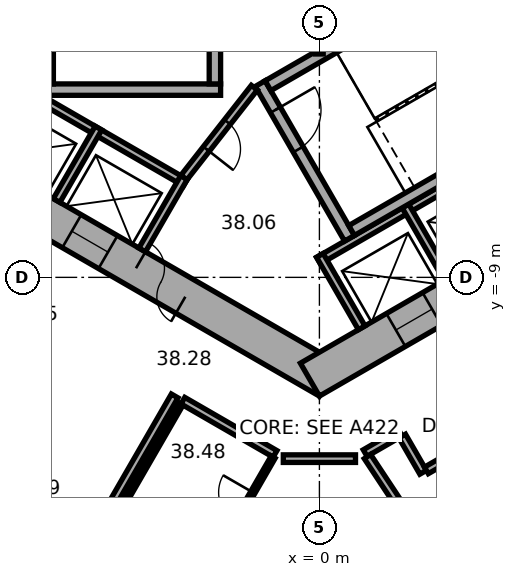
"""IFC4 building model, lengths in metres.
Left out: names, types, materials, properties, quantities, classifications, styles, units other than length and angle.
Written with IfcOpenShell. Run it as: python <this file> out.ifc"""

import sys

from ifc_helpers import new_model, si_unit, direction, frame, frame_2d, origin, place, context, subcontext, project, spatial, rectangle, extrude, element, fill, save


model = new_model("IFC4")
c1 = context("Model", 3, precision=1e-05, world=origin(), true_north=direction((0.0, 1.0)))
c2 = subcontext(c1, "Body", "Model", "MODEL_VIEW")
j1 = project(units=[si_unit("LENGTHUNIT", "METRE"), si_unit("PLANEANGLEUNIT", "RADIAN")], contexts=[c1])
p1 = place(None, origin())
s1 = spatial("IfcSite", under=j1, at=p1, CompositionType="ELEMENT")
p2 = place(p1, origin())
s2 = spatial("IfcBuilding", under=s1, at=p2, CompositionType="ELEMENT")
p3 = place(p2, frame((0.0, 0.0, 157.7)))
s3 = spatial("IfcBuildingStorey", under=s2, at=p3, CompositionType="ELEMENT", Elevation=157.7)
p4 = place(p3, frame((-10.25, -5.629, 0.0), z_axis=(0.0, 0.0, 1.0), x_axis=(0.866022616891, -0.50000482701, 0.0)))
e1 = element("IfcWall", 1, at=p4, inside=s3, PredefinedType="SHEAR", context=c2, shape_type="SweptSolid", body=[
    extrude(rectangle(XDim=12.125, YDim=1.0, at=frame_2d((6.062, 0.0))), origin(), (0.0, 0.0, 1.0), 3.7),
])
p5 = place(p4, frame((6.262, 0.0, 0.0)))
e2 = element("IfcOpeningElement", 2, at=p5, cuts=e1, PredefinedType="OPENING", context=c2, shape_type="SweptSolid", body=[
    extrude(rectangle(XDim=1.5, YDim=2.1, at=frame_2d((0.75, 1.05))), frame((0.0, 0.51, 0.0), z_axis=(0.0, -1.0, 0.0), x_axis=(1.0, 0.0, 0.0)), (0.0, 0.0, 1.0), 1.02),
])
p6 = place(p4, frame((1.712, 0.0, 0.0)))
e3 = element("IfcOpeningElement", 3, at=p6, cuts=e1, PredefinedType="OPENING", context=c2, shape_type="SweptSolid", body=[
    extrude(rectangle(XDim=1.1, YDim=2.1, at=frame_2d((0.55, 1.05))), frame((0.0, 0.51, 0.0), z_axis=(0.0, -1.0, 0.0), x_axis=(1.0, 0.0, 0.0)), (0.0, 0.0, 1.0), 1.02),
])
p7 = place(p4, frame((4.312, 0.0, 0.0)))
e4 = element("IfcOpeningElement", 4, at=p7, cuts=e1, PredefinedType="OPENING", context=c2, shape_type="SweptSolid", body=[
    extrude(rectangle(XDim=1.1, YDim=2.1, at=frame_2d((0.55, 1.05))), frame((0.0, 0.51, 0.0), z_axis=(0.0, -1.0, 0.0), x_axis=(1.0, 0.0, 0.0)), (0.0, 0.0, 1.0), 1.02),
])
p8 = place(p3, frame((-0.25, -11.691, 0.0), z_axis=(0.0, 0.0, 1.0), x_axis=(0.866022616891, 0.50000482701, 0.0)))
e5 = element("IfcWall", 5, at=p8, inside=s3, PredefinedType="SHEAR", context=c2, shape_type="SweptSolid", body=[
    extrude(rectangle(XDim=12.125, YDim=1.0, at=frame_2d((6.062, 0.0))), origin(), (0.0, 0.0, 1.0), 3.7),
])
p9 = place(p8, frame((2.612, 0.0, 0.0)))
e6 = element("IfcOpeningElement", 6, at=p9, cuts=e5, PredefinedType="OPENING", context=c2, shape_type="SweptSolid", body=[
    extrude(rectangle(XDim=1.1, YDim=2.1, at=frame_2d((0.55, 1.05))), frame((0.0, 0.51, 0.0), z_axis=(0.0, -1.0, 0.0), x_axis=(1.0, 0.0, 0.0)), (0.0, 0.0, 1.0), 1.02),
])
p10 = place(p8, frame((5.212, 0.0, 0.0)))
e7 = element("IfcOpeningElement", 7, at=p10, cuts=e5, PredefinedType="OPENING", context=c2, shape_type="SweptSolid", body=[
    extrude(rectangle(XDim=1.1, YDim=2.1, at=frame_2d((0.55, 1.05))), frame((0.0, 0.51, 0.0), z_axis=(0.0, -1.0, 0.0), x_axis=(1.0, 0.0, 0.0)), (0.0, 0.0, 1.0), 1.02),
])
p11 = place(p8, frame((7.812, 0.0, 0.0)))
e8 = element("IfcOpeningElement", 8, at=p11, cuts=e5, PredefinedType="OPENING", context=c2, shape_type="SweptSolid", body=[
    extrude(rectangle(XDim=1.1, YDim=2.1, at=frame_2d((0.55, 1.05))), frame((0.0, 0.51, 0.0), z_axis=(0.0, -1.0, 0.0), x_axis=(1.0, 0.0, 0.0)), (0.0, 0.0, 1.0), 1.02),
])
p12 = place(p3, frame((-18.789, -14.267, 0.0), z_axis=(0.0, 0.0, 1.0), x_axis=(0.866023315909, -0.500003616288, 0.0)))
e9 = element("IfcWall", 9, at=p12, inside=s3, PredefinedType="STANDARD", context=c2, shape_type="SweptSolid", body=[
    extrude(rectangle(XDim=20.044, YDim=0.2, at=frame_2d((10.022, 0.0))), origin(), (0.0, 0.0, 1.0), 3.7),
])
p13 = place(p12, frame((1.314, 0.0, 0.9)))
e10 = element("IfcOpeningElement", 10, at=p13, cuts=e9, PredefinedType="OPENING", context=c2, shape_type="SweptSolid", body=[
    extrude(rectangle(XDim=2.4, YDim=2.0, at=frame_2d((1.2, 1.0))), frame((0.0, 0.11, 0.0), z_axis=(0.0, -1.0, 0.0), x_axis=(1.0, 0.0, 0.0)), (0.0, 0.0, 1.0), 0.22),
])
p14 = place(p12, frame((5.069, 0.0, 0.9)))
e11 = element("IfcOpeningElement", 11, at=p14, cuts=e9, PredefinedType="OPENING", context=c2, shape_type="SweptSolid", body=[
    extrude(rectangle(XDim=2.4, YDim=2.0, at=frame_2d((1.2, 1.0))), frame((0.0, 0.11, 0.0), z_axis=(0.0, -1.0, 0.0), x_axis=(1.0, 0.0, 0.0)), (0.0, 0.0, 1.0), 0.22),
])
p15 = place(p12, frame((8.823, 0.0, 0.9)))
e12 = element("IfcOpeningElement", 12, at=p15, cuts=e9, PredefinedType="OPENING", context=c2, shape_type="SweptSolid", body=[
    extrude(rectangle(XDim=2.4, YDim=2.0, at=frame_2d((1.2, 1.0))), frame((0.0, 0.11, 0.0), z_axis=(0.0, -1.0, 0.0), x_axis=(1.0, 0.0, 0.0)), (0.0, 0.0, 1.0), 0.22),
])
p16 = place(p12, frame((12.577, 0.0, 0.9)))
e13 = element("IfcOpeningElement", 13, at=p16, cuts=e9, PredefinedType="OPENING", context=c2, shape_type="SweptSolid", body=[
    extrude(rectangle(XDim=2.4, YDim=2.0, at=frame_2d((1.2, 1.0))), frame((0.0, 0.11, 0.0), z_axis=(0.0, -1.0, 0.0), x_axis=(1.0, 0.0, 0.0)), (0.0, 0.0, 1.0), 0.22),
])
p17 = place(p12, frame((16.331, 0.0, 0.9)))
e14 = element("IfcOpeningElement", 14, at=p17, cuts=e9, PredefinedType="OPENING", context=c2, shape_type="SweptSolid", body=[
    extrude(rectangle(XDim=2.4, YDim=2.0, at=frame_2d((1.2, 1.0))), frame((0.0, 0.11, 0.0), z_axis=(0.0, -1.0, 0.0), x_axis=(1.0, 0.0, 0.0)), (0.0, 0.0, 1.0), 0.22),
])
p18 = place(p3, frame((2.911, -24.156, 0.0), z_axis=(0.0, 0.0, 1.0), x_axis=(0.833882163564, 0.551942512668, 0.0)))
e15 = element("IfcWall", 15, at=p18, inside=s3, PredefinedType="STANDARD", context=c2, shape_type="SweptSolid", body=[
    extrude(rectangle(XDim=20.044, YDim=0.2, at=frame_2d((10.022, 0.0))), origin(), (0.0, 0.0, 1.0), 3.7),
])
p19 = place(p18, frame((1.313, 0.0, 0.9)))
e16 = element("IfcOpeningElement", 16, at=p19, cuts=e15, PredefinedType="OPENING", context=c2, shape_type="SweptSolid", body=[
    extrude(rectangle(XDim=2.4, YDim=2.0, at=frame_2d((1.2, 1.0))), frame((0.0, 0.11, 0.0), z_axis=(0.0, -1.0, 0.0), x_axis=(1.0, 0.0, 0.0)), (0.0, 0.0, 1.0), 0.22),
])
p20 = place(p18, frame((5.067, 0.0, 0.9)))
e17 = element("IfcOpeningElement", 17, at=p20, cuts=e15, PredefinedType="OPENING", context=c2, shape_type="SweptSolid", body=[
    extrude(rectangle(XDim=2.4, YDim=2.0, at=frame_2d((1.2, 1.0))), frame((0.0, 0.11, 0.0), z_axis=(0.0, -1.0, 0.0), x_axis=(1.0, 0.0, 0.0)), (0.0, 0.0, 1.0), 0.22),
])
p21 = place(p18, frame((8.821, 0.0, 0.9)))
e18 = element("IfcOpeningElement", 18, at=p21, cuts=e15, PredefinedType="OPENING", context=c2, shape_type="SweptSolid", body=[
    extrude(rectangle(XDim=2.4, YDim=2.0, at=frame_2d((1.2, 1.0))), frame((0.0, 0.11, 0.0), z_axis=(0.0, -1.0, 0.0), x_axis=(1.0, 0.0, 0.0)), (0.0, 0.0, 1.0), 0.22),
])
p22 = place(p18, frame((12.575, 0.0, 0.9)))
e19 = element("IfcOpeningElement", 19, at=p22, cuts=e15, PredefinedType="OPENING", context=c2, shape_type="SweptSolid", body=[
    extrude(rectangle(XDim=2.4, YDim=2.0, at=frame_2d((1.2, 1.0))), frame((0.0, 0.11, 0.0), z_axis=(0.0, -1.0, 0.0), x_axis=(1.0, 0.0, 0.0)), (0.0, 0.0, 1.0), 0.22),
])
p23 = place(p18, frame((16.329, 0.0, 0.9)))
e20 = element("IfcOpeningElement", 20, at=p23, cuts=e15, PredefinedType="OPENING", context=c2, shape_type="SweptSolid", body=[
    extrude(rectangle(XDim=2.4, YDim=2.0, at=frame_2d((1.2, 1.0))), frame((0.0, 0.11, 0.0), z_axis=(0.0, -1.0, 0.0), x_axis=(1.0, 0.0, 0.0)), (0.0, 0.0, 1.0), 0.22),
])
p24 = place(p3, frame((-8.203, -3.809, 0.0), z_axis=(0.0, 0.0, 1.0), x_axis=(0.866028230842, -0.499995103361, 0.0)))
e21 = element("IfcWall", 21, at=p24, inside=s3, PredefinedType="PARTITIONING", context=c2, shape_type="SweptSolid", body=[
    extrude(rectangle(XDim=5.4, YDim=0.2, at=frame_2d((2.7, 0.0))), origin(), (0.0, 0.0, 1.0), 3.42),
])
p25 = place(p3, frame((-5.815, -5.072, 0.0), z_axis=(0.0, 0.0, 1.0), x_axis=(-0.499946605688, -0.86605622881, 0.0)))
e22 = element("IfcWall", 22, at=p25, inside=s3, PredefinedType="PARTITIONING", context=c2, shape_type="SweptSolid", body=[
    extrude(rectangle(XDim=2.2, YDim=0.2, at=frame_2d((1.1, 0.0))), origin(), (0.0, 0.0, 1.0), 3.42),
])
p26 = place(p3, frame((-3.563, -6.372, 0.0), z_axis=(0.0, 0.0, 1.0), x_axis=(-0.499994660107, -0.866028486751, 0.0)))
e23 = element("IfcWall", 23, at=p26, inside=s3, PredefinedType="PARTITIONING", context=c2, shape_type="SweptSolid", body=[
    extrude(rectangle(XDim=2.2, YDim=0.2, at=frame_2d((1.1, 0.0))), origin(), (0.0, 0.0, 1.0), 3.42),
])
p27 = place(p3, frame((-0.024, -8.559, 0.0), z_axis=(0.0, 0.0, 1.0), x_axis=(0.866026010844, 0.49999894854, 0.0)))
e24 = element("IfcWall", 24, at=p27, inside=s3, PredefinedType="PARTITIONING", context=c2, shape_type="SweptSolid", body=[
    extrude(rectangle(XDim=8.0, YDim=0.2, at=frame_2d((4.0, 0.0))), origin(), (0.0, 0.0, 1.0), 3.42),
])
for number, where, z_axis, x_axis in (
    (25, (0.013, -8.422, 0.0), (0.0, 0.0, 1.0), (0.5, -0.866, 0.0)),
    (26, (2.264, -7.122, 0.0), (0.0, 0.0, 1.0), (0.5, -0.866, 0.0)),
):
    element("IfcWall", number, at=place(p3, frame(where, z_axis=z_axis, x_axis=x_axis)), inside=s3, PredefinedType="PARTITIONING", context=c2, shape_type="SweptSolid", body=[
        extrude(rectangle(XDim=2.2, YDim=0.2, at=frame_2d((1.1, 0.0))), origin(), (0.0, 0.0, 1.0), 3.42),
    ])
p28 = place(p3, frame((-2.6, -4.06, 0.0), z_axis=(0.0, 0.0, 1.0), x_axis=(-1.0, 0.0, 0.0)))
e27 = element("IfcWall", 27, at=p28, inside=s3, PredefinedType="SHEAR", context=c2, shape_type="SweptSolid", body=[
    extrude(rectangle(XDim=4.7, YDim=0.3, at=frame_2d((2.35, 0.0))), origin(), (0.0, 0.0, 1.0), 3.42),
])
for number, where, z_axis, x_axis in (
    (28, (-2.75, 3.15, 0.0), (0.0, 0.0, 1.0), (0.0, -1.0, 0.0)),
    (29, (-7.15, 3.15, 0.0), (0.0, 0.0, 1.0), (0.0, -1.0, 0.0)),
):
    element("IfcWall", number, at=place(p3, frame(where, z_axis=z_axis, x_axis=x_axis)), inside=s3, PredefinedType="SHEAR", context=c2, shape_type="SweptSolid", body=[
        extrude(rectangle(XDim=7.06, YDim=0.3, at=frame_2d((3.53, 0.0))), origin(), (0.0, 0.0, 1.0), 3.42),
    ])
p29 = place(p3, frame((-1.558, -3.902, 0.0), z_axis=(0.0, 0.0, 1.0), x_axis=(0.499977259774, -0.866038532462, 0.0)))
e30 = element("IfcWall", 30, at=p29, inside=s3, PredefinedType="SHEAR", context=c2, shape_type="SweptSolid", body=[
    extrude(rectangle(XDim=4.7, YDim=0.3, at=frame_2d((2.35, 0.0))), origin(), (0.0, 0.0, 1.0), 3.42),
])
p30 = place(p29, frame((0.8, 0.0, 0.0)))
e31 = element("IfcOpeningElement", 31, at=p30, cuts=e30, PredefinedType="OPENING", context=c2, shape_type="SweptSolid", body=[
    extrude(rectangle(XDim=1.2, YDim=2.1, at=frame_2d((0.6, 1.05))), frame((0.0, 0.16, 0.0), z_axis=(0.0, -1.0, 0.0), x_axis=(1.0, 0.0, 0.0)), (0.0, 0.0, 1.0), 0.32),
])
for number, where, z_axis, x_axis in (
    (32, (-1.353, -3.957, 0.0), (0.0, 0.0, 1.0), (0.866, 0.5, 0.0)),
    (33, (0.847, -7.767, 0.0), (0.0, 0.0, 1.0), (0.866, 0.5, 0.0)),
):
    element("IfcWall", number, at=place(p3, frame(where, z_axis=z_axis, x_axis=x_axis)), inside=s3, PredefinedType="SHEAR", context=c2, shape_type="SweptSolid", body=[
        extrude(rectangle(XDim=7.06, YDim=0.3, at=frame_2d((3.53, 0.0))), origin(), (0.0, 0.0, 1.0), 3.42),
    ])
p31 = place(p3, frame((-1.712, -4.008, 0.0), z_axis=(0.0, 0.0, 1.0), x_axis=(-0.616549420702, -0.787316208287, 0.0)))
e34 = element("IfcWall", 34, at=p31, inside=s3, PredefinedType="PARTITIONING", context=c2, shape_type="SweptSolid", body=[
    extrude(rectangle(XDim=3.002, YDim=0.2, at=frame_2d((1.501, 0.0))), origin(), (0.0, 0.0, 1.0), 3.42),
])
p32 = place(p31, frame((1.15, 0.0, 0.0)))
e35 = element("IfcOpeningElement", 35, at=p32, cuts=e34, PredefinedType="OPENING", context=c2, shape_type="SweptSolid", body=[
    extrude(rectangle(XDim=0.9, YDim=2.1, at=frame_2d((0.45, 1.05))), frame((0.0, 0.11, 0.0), z_axis=(0.0, -1.0, 0.0), x_axis=(1.0, 0.0, 0.0)), (0.0, 0.0, 1.0), 0.22),
])
p33 = place(p3, frame((0.0, -3.122, 0.0), z_axis=(0.0, 0.0, 1.0), x_axis=(0.0, 1.0, 0.0)))
e36 = element("IfcWall", 36, at=p33, inside=s3, PredefinedType="PARTITIONING", context=c2, shape_type="SweptSolid", body=[
    extrude(rectangle(XDim=6.245, YDim=0.2, at=frame_2d((3.122, 0.0))), origin(), (0.0, 0.0, 1.0), 3.42),
])
p34 = place(p3, frame((-7.984, -19.351, 0.0), z_axis=(0.0, 0.0, 1.0), x_axis=(0.500010139422, 0.866019549707, 0.0)))
e37 = element("IfcWall", 37, at=p34, inside=s3, PredefinedType="PARTITIONING", context=c2, shape_type="SweptSolid", body=[
    extrude(rectangle(XDim=8.35, YDim=0.2, at=frame_2d((4.175, 0.0))), origin(), (0.0, 0.0, 1.0), 3.42),
])
p35 = place(p34, frame((3.675, 0.0, 0.0)))
e38 = element("IfcOpeningElement", 38, at=p35, cuts=e37, PredefinedType="OPENING", context=c2, shape_type="SweptSolid", body=[
    extrude(rectangle(XDim=1.0, YDim=2.1, at=frame_2d((0.5, 1.05))), frame((0.0, 0.11, 0.0), z_axis=(0.0, -1.0, 0.0), x_axis=(1.0, 0.0, 0.0)), (0.0, 0.0, 1.0), 0.22),
])
p36 = place(p3, frame((-5.192, -15.016, 0.0), z_axis=(0.0, 0.0, 1.0), x_axis=(0.500026960575, 0.86600983753, 0.0)))
e39 = element("IfcWall", 39, at=p36, inside=s3, PredefinedType="PARTITIONING", context=c2, shape_type="SweptSolid", body=[
    extrude(rectangle(XDim=3.1, YDim=0.12, at=frame_2d((1.55, 0.0))), origin(), (0.0, 0.0, 1.0), 3.42),
])
p37 = place(p3, frame((-3.592, -12.244, 0.0), z_axis=(0.0, 0.0, 1.0), x_axis=(0.866034573852, -0.49998411664, 0.0)))
e40 = element("IfcWall", 40, at=p37, inside=s3, PredefinedType="PARTITIONING", context=c2, shape_type="SweptSolid", body=[
    extrude(rectangle(XDim=2.8, YDim=0.2, at=frame_2d((1.4, 0.0))), origin(), (0.0, 0.0, 1.0), 3.42),
])
p38 = place(p3, frame((-1.217, -13.731, 0.0), z_axis=(0.0, 0.0, 1.0), x_axis=(-0.499991248344, -0.866030456496, 0.0)))
e41 = element("IfcWall", 41, at=p38, inside=s3, PredefinedType="PARTITIONING", context=c2, shape_type="SweptSolid", body=[
    extrude(rectangle(XDim=3.04, YDim=0.12, at=frame_2d((1.52, 0.0))), origin(), (0.0, 0.0, 1.0), 3.42),
])
p39 = place(p38, frame((1.07, 0.0, 0.0)))
e42 = element("IfcOpeningElement", 42, at=p39, cuts=e41, PredefinedType="OPENING", context=c2, shape_type="SweptSolid", body=[
    extrude(rectangle(XDim=0.9, YDim=2.1, at=frame_2d((0.45, 1.05))), frame((0.0, 0.07, 0.0), z_axis=(0.0, -1.0, 0.0), x_axis=(1.0, 0.0, 0.0)), (0.0, 0.0, 1.0), 0.14),
])
p40 = place(p3, frame((-0.95, -13.77, 0.0), z_axis=(0.0, 0.0, 1.0), x_axis=(1.0, 0.0, 0.0)))
e43 = element("IfcWall", 43, at=p40, inside=s3, PredefinedType="PARTITIONING", context=c2, shape_type="SweptSolid", body=[
    extrude(rectangle(XDim=1.9, YDim=0.2, at=frame_2d((0.95, 0.0))), origin(), (0.0, 0.0, 1.0), 3.42),
])
p41 = place(p3, frame((1.204, -13.623, 0.0), z_axis=(0.0, 0.0, 1.0), x_axis=(0.866040989419, 0.499973003918, 0.0)))
e44 = element("IfcWall", 44, at=p41, inside=s3, PredefinedType="PARTITIONING", context=c2, shape_type="SweptSolid", body=[
    extrude(rectangle(XDim=1.068, YDim=0.2, at=frame_2d((0.534, 0.0))), origin(), (0.0, 0.0, 1.0), 3.42),
])
p42 = place(p3, frame((2.179, -13.176, 0.0), z_axis=(0.0, 0.0, 1.0), x_axis=(0.499978356969, -0.866037899034, 0.0)))
e45 = element("IfcWall", 45, at=p42, inside=s3, PredefinedType="PARTITIONING", context=c2, shape_type="SweptSolid", body=[
    extrude(rectangle(XDim=1.101, YDim=0.2, at=frame_2d((0.551, 0.0))), origin(), (0.0, 0.0, 1.0), 3.42),
])
p43 = place(p3, frame((2.816, -14.079, 0.0), z_axis=(0.0, 0.0, 1.0), x_axis=(0.866021128829, 0.500007404367, 0.0)))
e46 = element("IfcWall", 46, at=p43, inside=s3, PredefinedType="PARTITIONING", context=c2, shape_type="SweptSolid", body=[
    extrude(rectangle(XDim=8.702, YDim=0.2, at=frame_2d((4.351, 0.0))), origin(), (0.0, 0.0, 1.0), 3.42),
])
p44 = place(p43, frame((0.833, 0.0, 0.0)))
e47 = element("IfcOpeningElement", 47, at=p44, cuts=e46, PredefinedType="OPENING", context=c2, shape_type="SweptSolid", body=[
    extrude(rectangle(XDim=1.0, YDim=2.1, at=frame_2d((0.5, 1.05))), frame((0.0, 0.11, 0.0), z_axis=(0.0, -1.0, 0.0), x_axis=(1.0, 0.0, 0.0)), (0.0, 0.0, 1.0), 0.22),
])
p45 = place(p3, frame((6.02, -20.899, 0.0), z_axis=(0.0, 0.0, 1.0), x_axis=(-0.551943990108, 0.833881185651, 0.0)))
e48 = element("IfcWall", 48, at=p45, inside=s3, PredefinedType="PARTITIONING", context=c2, shape_type="SweptSolid", body=[
    extrude(rectangle(XDim=8.615, YDim=0.2, at=frame_2d((4.308, 0.0))), origin(), (0.0, 0.0, 1.0), 3.42),
])
p46 = place(p5, origin())
e49 = element("IfcDoor", 49, at=p46, inside=s3, OperationType="DOUBLE_DOOR_SINGLE_SWING", PredefinedType="DOOR", context=c2, shape_type="SweptSolid", body=[
    extrude(rectangle(XDim=1.5, YDim=2.1, at=frame_2d((0.75, 1.05))), frame((0.0, 0.025, 0.0), z_axis=(0.0, -1.0, 0.0), x_axis=(1.0, 0.0, 0.0)), (0.0, 0.0, 1.0), 0.05),
])
fill(e2, e49)
p47 = place(p30, origin())
e50 = element("IfcDoor", 50, at=p47, inside=s3, OperationType="SINGLE_SWING_RIGHT", PredefinedType="DOOR", context=c2, shape_type="SweptSolid", body=[
    extrude(rectangle(XDim=1.2, YDim=2.1, at=frame_2d((0.6, 1.05))), frame((0.0, 0.025, 0.0), z_axis=(0.0, -1.0, 0.0), x_axis=(1.0, 0.0, 0.0)), (0.0, 0.0, 1.0), 0.05),
])
fill(e31, e50)
p48 = place(p32, origin())
e51 = element("IfcDoor", 51, at=p48, inside=s3, OperationType="SINGLE_SWING_LEFT", PredefinedType="DOOR", context=c2, shape_type="SweptSolid", body=[
    extrude(rectangle(XDim=0.9, YDim=2.1, at=frame_2d((0.45, 1.05))), frame((0.0, 0.025, 0.0), z_axis=(0.0, -1.0, 0.0), x_axis=(1.0, 0.0, 0.0)), (0.0, 0.0, 1.0), 0.05),
])
fill(e35, e51)
p49 = place(p7, origin())
e52 = element("IfcDoor", 52, at=p49, inside=s3, OperationType="DOUBLE_DOOR_SLIDING", PredefinedType="DOOR", context=c2, shape_type="SweptSolid", body=[
    extrude(rectangle(XDim=1.1, YDim=2.1, at=frame_2d((0.55, 1.05))), frame((0.0, 0.025, 0.0), z_axis=(0.0, -1.0, 0.0), x_axis=(1.0, 0.0, 0.0)), (0.0, 0.0, 1.0), 0.05),
])
fill(e4, e52)
p50 = place(p9, origin())
e53 = element("IfcDoor", 53, at=p50, inside=s3, OperationType="DOUBLE_DOOR_SLIDING", PredefinedType="DOOR", context=c2, shape_type="SweptSolid", body=[
    extrude(rectangle(XDim=1.1, YDim=2.1, at=frame_2d((0.55, 1.05))), frame((0.0, 0.025, 0.0), z_axis=(0.0, -1.0, 0.0), x_axis=(1.0, 0.0, 0.0)), (0.0, 0.0, 1.0), 0.05),
])
fill(e6, e53)
p51 = place(p39, origin())
e54 = element("IfcDoor", 54, at=p51, inside=s3, OperationType="SINGLE_SWING_LEFT", PredefinedType="DOOR", context=c2, shape_type="SweptSolid", body=[
    extrude(rectangle(XDim=0.9, YDim=2.1, at=frame_2d((0.45, 1.05))), frame((0.0, 0.025, 0.0), z_axis=(0.0, -1.0, 0.0), x_axis=(1.0, 0.0, 0.0)), (0.0, 0.0, 1.0), 0.05),
])
fill(e42, e54)
save(model, sys.argv[1])
